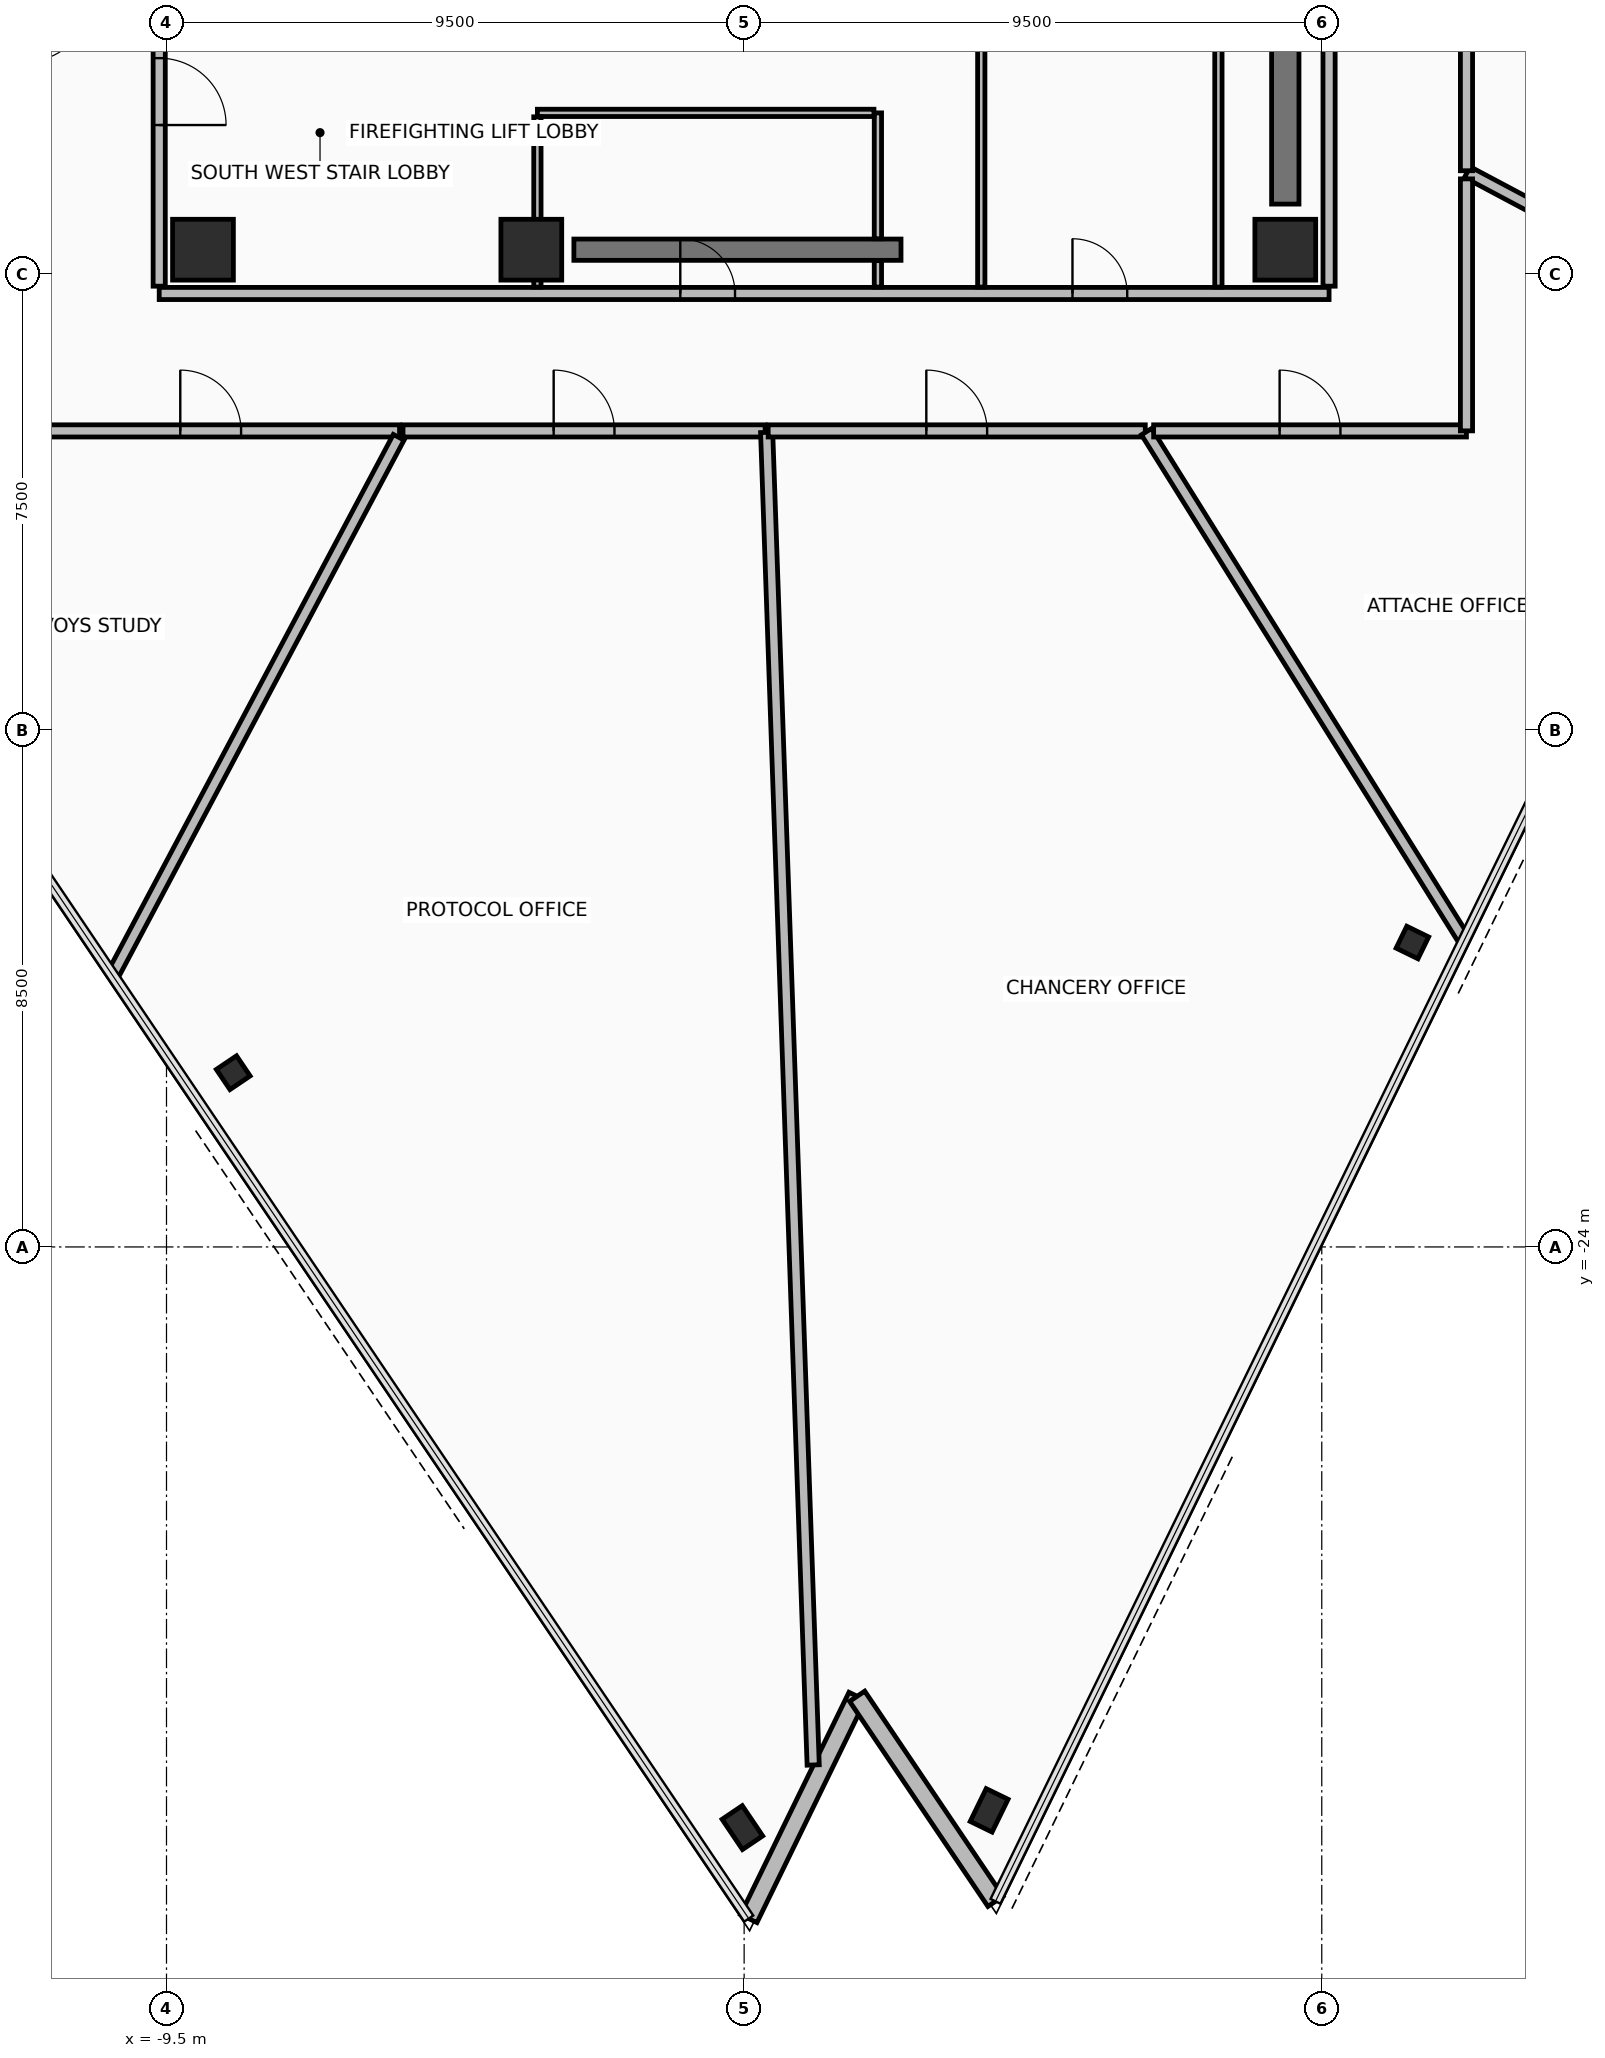
"""IFC4 building model, lengths in metres.
Left out: names, types, materials, properties, quantities, classifications, styles, units other than length and angle.
Written with IfcOpenShell. Run it as: python <this file> out.ifc"""

import sys

from ifc_helpers import new_model, si_unit, direction, frame, frame_2d, origin, origin_2d, place, context, subcontext, project, spatial, rectangle, hollow_rectangle, extrude, element, fill, save


model = new_model("IFC4")
c1 = context("Model", 3, precision=1e-05, world=origin(), true_north=direction((0.0, 1.0)))
c2 = subcontext(c1, "Body", "Model", "MODEL_VIEW")
j1 = project(units=[si_unit("LENGTHUNIT", "METRE"), si_unit("PLANEANGLEUNIT", "RADIAN")], contexts=[c1])
p1 = place(None, origin())
s1 = spatial("IfcSite", under=j1, at=p1, CompositionType="ELEMENT")
p2 = place(p1, origin())
s2 = spatial("IfcBuilding", under=s1, at=p2, CompositionType="ELEMENT")
p3 = place(p2, frame((0.0, 0.0, 275.0)))
s3 = spatial("IfcBuildingStorey", under=s2, at=p3, CompositionType="ELEMENT", Elevation=275.0)
for number, where, z_axis, x_axis in (
    (1, (-8.9, -7.6, 0.0), (0.0, 0.0, 1.0), (1.0, 0.0, 0.0)),
    (2, (-3.5, -7.6, 0.0), (0.0, 0.0, 1.0), (1.0, 0.0, 0.0)),
    (3, (8.9, -7.6, 0.0), (0.0, 0.0, 1.0), (1.0, 0.0, 0.0)),
):
    element("IfcColumn", number, at=place(p3, frame(where, z_axis=z_axis, x_axis=x_axis)), inside=s3, PredefinedType="COLUMN", context=c2, shape_type="SweptSolid", body=[
        extrude(rectangle(XDim=1.0, YDim=1.0, at=origin_2d()), origin(), (0.0, 0.0, 1.0), 4.75),
    ])
p4 = place(p3, frame((-8.402, -21.135, 0.0), z_axis=(0.0, 0.0, 1.0), x_axis=(-0.559192903471, 0.829037572555, 0.0)))
e4 = element("IfcColumn", 4, at=p4, inside=s3, PredefinedType="COLUMN", context=c2, shape_type="SweptSolid", body=[
    extrude(hollow_rectangle(XDim=0.4, YDim=0.4, WallThickness=0.025, at=origin_2d()), origin(), (0.0, 0.0, 1.0), 4.75),
])
for number, where, z_axis, x_axis in (
    (5, (-0.029, -33.549, 0.0), (0.0, 0.0, 1.0), (-0.559, 0.829, 0.0)),
    (6, (4.029, -33.265, 0.0), (0.0, 0.0, 1.0), (0.438, 0.899, 0.0)),
):
    element("IfcColumn", number, at=place(p3, frame(where, z_axis=z_axis, x_axis=x_axis)), inside=s3, PredefinedType="COLUMN", context=c2, shape_type="SweptSolid", body=[
        extrude(hollow_rectangle(XDim=0.4, YDim=0.6, WallThickness=0.03, at=origin_2d()), origin(), (0.0, 0.0, 1.0), 4.75),
    ])
p5 = place(p3, frame((10.99, -18.994, 0.0), z_axis=(0.0, 0.0, 1.0), x_axis=(0.43837271548, 0.898793281196, 0.0)))
e7 = element("IfcColumn", 7, at=p5, inside=s3, PredefinedType="COLUMN", context=c2, shape_type="SweptSolid", body=[
    extrude(hollow_rectangle(XDim=0.4, YDim=0.4, WallThickness=0.025, at=origin_2d()), origin(), (0.0, 0.0, 1.0), 4.75),
])
p6 = place(p3, frame((0.076, -35.045, 0.0), z_axis=(0.0, 0.0, 1.0), x_axis=(0.438357414153, 0.898800744024, 0.0)))
e8 = element("IfcWall", 8, at=p6, inside=s3, PredefinedType="STANDARD", context=c2, shape_type="SweptSolid", body=[
    extrude(rectangle(XDim=4.068, YDim=0.3, at=frame_2d((2.034, 0.0))), origin(), (0.0, 0.0, 1.0), 2.255),
])
p7 = place(p3, frame((1.859, -31.389, 0.0), z_axis=(0.0, 0.0, 1.0), x_axis=(0.559206900681, -0.829028131145, 0.0)))
e9 = element("IfcWall", 9, at=p7, inside=s3, PredefinedType="STANDARD", context=c2, shape_type="SweptSolid", body=[
    extrude(rectangle(XDim=4.068, YDim=0.3, at=frame_2d((2.034, 0.0))), origin(), (0.0, 0.0, 1.0), 2.255),
])
p8 = place(p3, frame((-2.8, -7.6, 0.0), z_axis=(0.0, 0.0, 1.0), x_axis=(1.0, 0.0, 0.0)))
e10 = element("IfcWall", 10, at=p8, inside=s3, PredefinedType="SHEAR", context=c2, shape_type="SweptSolid", body=[
    extrude(rectangle(XDim=5.38, YDim=0.35, at=frame_2d((2.69, 0.0))), origin(), (0.0, 0.0, 1.0), 4.56),
])
p9 = place(p3, frame((8.9, -6.85, 0.0), z_axis=(0.0, 0.0, 1.0), x_axis=(0.0, 1.0, 0.0)))
e11 = element("IfcWall", 11, at=p9, inside=s3, PredefinedType="SHEAR", context=c2, shape_type="SweptSolid", body=[
    extrude(rectangle(XDim=10.7, YDim=0.45, at=frame_2d((5.35, 0.0))), origin(), (0.0, 0.0, 1.0), 4.56),
])
p10 = place(p3, frame((-9.62, -8.32, 0.0), z_axis=(0.0, 0.0, 1.0), x_axis=(1.0, 0.0, 0.0)))
e12 = element("IfcWall", 12, at=p10, inside=s3, PredefinedType="PARTITIONING", context=c2, shape_type="SweptSolid", body=[
    extrude(rectangle(XDim=19.24, YDim=0.2, at=frame_2d((9.62, 0.0))), origin(), (0.0, 0.0, 1.0), 2.355),
])
p11 = place(p10, frame((8.57, 0.0, 0.0)))
e13 = element("IfcOpeningElement", 13, at=p11, cuts=e12, PredefinedType="OPENING", context=c2, shape_type="SweptSolid", body=[
    extrude(rectangle(XDim=0.9, YDim=2.1, at=frame_2d((0.45, 1.05))), frame((0.0, 0.11, 0.0), z_axis=(0.0, -1.0, 0.0), x_axis=(1.0, 0.0, 0.0)), (0.0, 0.0, 1.0), 0.22),
])
p12 = place(p10, frame((15.02, 0.0, 0.0)))
e14 = element("IfcOpeningElement", 14, at=p12, cuts=e12, PredefinedType="OPENING", context=c2, shape_type="SweptSolid", body=[
    extrude(rectangle(XDim=0.9, YDim=2.1, at=frame_2d((0.45, 1.05))), frame((0.0, 0.11, 0.0), z_axis=(0.0, -1.0, 0.0), x_axis=(1.0, 0.0, 0.0)), (0.0, 0.0, 1.0), 0.22),
])
p13 = place(p3, frame((-9.62, 8.2, 0.0), z_axis=(0.0, 0.0, 1.0), x_axis=(0.0, -1.0, 0.0)))
e15 = element("IfcWall", 15, at=p13, inside=s3, PredefinedType="PARTITIONING", context=c2, shape_type="SweptSolid", body=[
    extrude(rectangle(XDim=16.4, YDim=0.2, at=frame_2d((8.2, 0.0))), origin(), (0.0, 0.0, 1.0), 2.355),
])
p14 = place(p13, frame((12.65, 0.0, 0.0)))
e16 = element("IfcOpeningElement", 16, at=p14, cuts=e15, PredefinedType="OPENING", context=c2, shape_type="SweptSolid", body=[
    extrude(rectangle(XDim=1.1, YDim=2.15, at=frame_2d((0.55, 1.075))), frame((0.0, 0.11, 0.0), z_axis=(0.0, -1.0, 0.0), x_axis=(1.0, 0.0, 0.0)), (0.0, 0.0, 1.0), 0.22),
])
p15 = place(p3, frame((9.62, -8.2, 0.0), z_axis=(0.0, 0.0, 1.0), x_axis=(0.0, 1.0, 0.0)))
e17 = element("IfcWall", 17, at=p15, inside=s3, PredefinedType="PARTITIONING", context=c2, shape_type="SweptSolid", body=[
    extrude(rectangle(XDim=16.4, YDim=0.2, at=frame_2d((8.2, 0.0))), origin(), (0.0, 0.0, 1.0), 2.355),
])
p16 = place(p15, frame((12.65, 0.0, 0.0)))
e18 = element("IfcOpeningElement", 18, at=p16, cuts=e17, PredefinedType="OPENING", context=c2, shape_type="SweptSolid", body=[
    extrude(rectangle(XDim=1.1, YDim=2.15, at=frame_2d((0.55, 1.075))), frame((0.0, 0.11, 0.0), z_axis=(0.0, -1.0, 0.0), x_axis=(1.0, 0.0, 0.0)), (0.0, 0.0, 1.0), 0.22),
])
p17 = place(p3, frame((2.2, -8.215, 0.0), z_axis=(0.0, 0.0, 1.0), x_axis=(0.0, 1.0, 0.0)))
e19 = element("IfcWall", 19, at=p17, inside=s3, PredefinedType="PARTITIONING", context=c2, shape_type="SweptSolid", body=[
    extrude(rectangle(XDim=0.435, YDim=0.12, at=frame_2d((0.218, 0.0))), origin(), (0.0, 0.0, 1.0), 3.855),
])
p18 = place(p3, frame((2.2, -7.42, 0.0), z_axis=(0.0, 0.0, 1.0), x_axis=(0.0, 1.0, 0.0)))
e20 = element("IfcWall", 20, at=p18, inside=s3, PredefinedType="PARTITIONING", context=c2, shape_type="SweptSolid", body=[
    extrude(rectangle(XDim=2.07, YDim=0.12, at=frame_2d((1.035, 0.0))), origin(), (0.0, 0.0, 1.0), 3.855),
])
p19 = place(p3, frame((2.135, -5.35, 0.0), z_axis=(0.0, 0.0, 1.0), x_axis=(-1.0, 0.0, 0.0)))
e21 = element("IfcWall", 21, at=p19, inside=s3, PredefinedType="PARTITIONING", context=c2, shape_type="SweptSolid", body=[
    extrude(rectangle(XDim=5.535, YDim=0.12, at=frame_2d((2.768, 0.0))), origin(), (0.0, 0.0, 1.0), 3.855),
])
p20 = place(p3, frame((-3.4, -5.415, 0.0), z_axis=(0.0, 0.0, 1.0), x_axis=(0.0, -1.0, 0.0)))
e22 = element("IfcWall", 22, at=p20, inside=s3, PredefinedType="PARTITIONING", context=c2, shape_type="SweptSolid", body=[
    extrude(rectangle(XDim=2.8, YDim=0.12, at=frame_2d((1.4, 0.0))), origin(), (0.0, 0.0, 1.0), 2.355),
])
p21 = place(p3, frame((7.8, -8.215, 0.0), z_axis=(0.0, 0.0, 1.0), x_axis=(0.0, 1.0, 0.0)))
e23 = element("IfcWall", 23, at=p21, inside=s3, PredefinedType="PARTITIONING", context=c2, shape_type="SweptSolid", body=[
    extrude(rectangle(XDim=4.015, YDim=0.12, at=frame_2d((2.008, 0.0))), origin(), (0.0, 0.0, 1.0), 3.855),
])
p22 = place(p3, frame((3.9, -4.265, 0.0), z_axis=(0.0, 0.0, 1.0), x_axis=(0.0, -1.0, 0.0)))
e24 = element("IfcWall", 24, at=p22, inside=s3, PredefinedType="PARTITIONING", context=c2, shape_type="SweptSolid", body=[
    extrude(rectangle(XDim=3.95, YDim=0.12, at=frame_2d((1.975, 0.0))), origin(), (0.0, 0.0, 1.0), 3.855),
])
p23 = place(p3, frame((16.723, -8.892, 0.0), z_axis=(0.0, 0.0, 1.0), x_axis=(-0.882952698851, 0.469461959686, 0.0)))
e25 = element("IfcWall", 25, at=p23, inside=s3, PredefinedType="PARTITIONING", context=c2, shape_type="SweptSolid", body=[
    extrude(rectangle(XDim=5.47, YDim=0.2, at=frame_2d((2.735, 0.0))), origin(), (0.0, 0.0, 1.0), 2.255),
])
p24 = place(p3, frame((11.88, -6.302, 0.0), z_axis=(0.0, 0.0, 1.0), x_axis=(0.0, 1.0, 0.0)))
e26 = element("IfcWall", 26, at=p24, inside=s3, PredefinedType="PARTITIONING", context=c2, shape_type="SweptSolid", body=[
    extrude(rectangle(XDim=4.177, YDim=0.2, at=frame_2d((2.088, 0.0))), origin(), (0.0, 0.0, 1.0), 2.355),
])
p25 = place(p3, frame((-11.879, -10.58, 0.0), z_axis=(0.0, 0.0, 1.0), x_axis=(1.0, 0.0, 0.0)))
e27 = element("IfcWall", 27, at=p25, inside=s3, PredefinedType="PARTITIONING", context=c2, shape_type="SweptSolid", body=[
    extrude(rectangle(XDim=6.212, YDim=0.2, at=frame_2d((3.106, 0.0))), origin(), (0.0, 0.0, 1.0), 4.315),
])
p26 = place(p25, frame((2.606, 0.0, 0.0)))
e28 = element("IfcOpeningElement", 28, at=p26, cuts=e27, PredefinedType="OPENING", context=c2, shape_type="SweptSolid", body=[
    extrude(rectangle(XDim=1.0, YDim=2.15, at=frame_2d((0.5, 1.075))), frame((0.0, 0.11, 0.0), z_axis=(0.0, -1.0, 0.0), x_axis=(1.0, 0.0, 0.0)), (0.0, 0.0, 1.0), 0.22),
])
p27 = place(p3, frame((-5.681, -10.685, 0.0), z_axis=(0.0, 0.0, 1.0), x_axis=(-0.469465104715, -0.882951026646, 0.0)))
e29 = element("IfcWall", 29, at=p27, inside=s3, PredefinedType="PARTITIONING", context=c2, shape_type="SweptSolid", body=[
    extrude(rectangle(XDim=10.022, YDim=0.2, at=frame_2d((5.011, 0.0))), origin(), (0.0, 0.0, 1.0), 2.255),
])
p28 = place(p3, frame((-5.611, -10.58, 0.0), z_axis=(0.0, 0.0, 1.0), x_axis=(1.0, 0.0, 0.0)))
e30 = element("IfcWall", 30, at=p28, inside=s3, PredefinedType="PARTITIONING", context=c2, shape_type="SweptSolid", body=[
    extrude(rectangle(XDim=5.956, YDim=0.2, at=frame_2d((2.978, 0.0))), origin(), (0.0, 0.0, 1.0), 2.355),
])
p29 = place(p28, frame((2.478, 0.0, 0.0)))
e31 = element("IfcOpeningElement", 31, at=p29, cuts=e30, PredefinedType="OPENING", context=c2, shape_type="SweptSolid", body=[
    extrude(rectangle(XDim=1.0, YDim=2.15, at=frame_2d((0.5, 1.075))), frame((0.0, 0.11, 0.0), z_axis=(0.0, -1.0, 0.0), x_axis=(1.0, 0.0, 0.0)), (0.0, 0.0, 1.0), 0.22),
])
p30 = place(p3, frame((0.37, -10.604, 0.0), z_axis=(0.0, 0.0, 1.0), x_axis=(0.034892513881, -0.99939107084, 0.0)))
e32 = element("IfcWall", 32, at=p30, inside=s3, PredefinedType="PARTITIONING", context=c2, shape_type="SweptSolid", body=[
    extrude(rectangle(XDim=21.928, YDim=0.2, at=frame_2d((10.964, 0.0))), origin(), (0.0, 0.0, 1.0), 2.355),
])
p31 = place(p3, frame((0.395, -10.58, 0.0), z_axis=(0.0, 0.0, 1.0), x_axis=(1.0, 0.0, 0.0)))
e33 = element("IfcWall", 33, at=p31, inside=s3, PredefinedType="PARTITIONING", context=c2, shape_type="SweptSolid", body=[
    extrude(rectangle(XDim=6.202, YDim=0.2, at=frame_2d((3.101, 0.0))), origin(), (0.0, 0.0, 1.0), 4.56),
])
p32 = place(p31, frame((2.601, 0.0, 0.0)))
e34 = element("IfcOpeningElement", 34, at=p32, cuts=e33, PredefinedType="OPENING", context=c2, shape_type="SweptSolid", body=[
    extrude(rectangle(XDim=1.0, YDim=2.15, at=frame_2d((0.5, 1.075))), frame((0.0, 0.11, 0.0), z_axis=(0.0, -1.0, 0.0), x_axis=(1.0, 0.0, 0.0)), (0.0, 0.0, 1.0), 0.22),
])
p33 = place(p3, frame((6.618, -10.592, 0.0), z_axis=(0.0, 0.0, 1.0), x_axis=(0.529918705885, -0.848048445051, 0.0)))
e35 = element("IfcWall", 35, at=p33, inside=s3, PredefinedType="PARTITIONING", context=c2, shape_type="SweptSolid", body=[
    extrude(rectangle(XDim=9.847, YDim=0.2, at=frame_2d((4.923, 0.0))), origin(), (0.0, 0.0, 1.0), 2.255),
])
p34 = place(p3, frame((6.735, -10.58, 0.0), z_axis=(0.0, 0.0, 1.0), x_axis=(1.0, 0.0, 0.0)))
e36 = element("IfcWall", 36, at=p34, inside=s3, PredefinedType="PARTITIONING", context=c2, shape_type="SweptSolid", body=[
    extrude(rectangle(XDim=5.145, YDim=0.2, at=frame_2d((2.572, 0.0))), origin(), (0.0, 0.0, 1.0), 2.355),
])
p35 = place(p34, frame((2.072, 0.0, 0.0)))
e37 = element("IfcOpeningElement", 37, at=p35, cuts=e36, PredefinedType="OPENING", context=c2, shape_type="SweptSolid", body=[
    extrude(rectangle(XDim=1.0, YDim=2.15, at=frame_2d((0.5, 1.075))), frame((0.0, 0.11, 0.0), z_axis=(0.0, -1.0, 0.0), x_axis=(1.0, 0.0, 0.0)), (0.0, 0.0, 1.0), 0.22),
])
p36 = place(p3, frame((11.88, -10.579, 0.0), z_axis=(0.0, 0.0, 1.0), x_axis=(0.0, 1.0, 0.0)))
e38 = element("IfcWall", 38, at=p36, inside=s3, PredefinedType="PARTITIONING", context=c2, shape_type="SweptSolid", body=[
    extrude(rectangle(XDim=4.144, YDim=0.2, at=frame_2d((2.072, 0.0))), origin(), (0.0, 0.0, 1.0), 4.315),
])
p37 = place(p14, frame((1.1, 0.0, 0.0), z_axis=(0.0, 0.0, 1.0), x_axis=(-1.0, 0.0, 0.0)))
e39 = element("IfcDoor", 39, at=p37, inside=s3, OperationType="SINGLE_SWING_LEFT", PredefinedType="DOOR", context=c2, shape_type="SweptSolid", body=[
    extrude(rectangle(XDim=1.1, YDim=2.15, at=frame_2d((0.55, 1.075))), frame((0.0, 0.025, 0.0), z_axis=(0.0, -1.0, 0.0), x_axis=(1.0, 0.0, 0.0)), (0.0, 0.0, 1.0), 0.05),
])
fill(e16, e39)
p38 = place(p11, origin())
e40 = element("IfcDoor", 40, at=p38, inside=s3, OperationType="SINGLE_SWING_LEFT", PredefinedType="DOOR", context=c2, shape_type="SweptSolid", body=[
    extrude(rectangle(XDim=0.9, YDim=2.1, at=frame_2d((0.45, 1.05))), frame((0.0, 0.025, 0.0), z_axis=(0.0, -1.0, 0.0), x_axis=(1.0, 0.0, 0.0)), (0.0, 0.0, 1.0), 0.05),
])
fill(e13, e40)
p39 = place(p12, origin())
e41 = element("IfcDoor", 41, at=p39, inside=s3, OperationType="SINGLE_SWING_LEFT", PredefinedType="DOOR", context=c2, shape_type="SweptSolid", body=[
    extrude(rectangle(XDim=0.9, YDim=2.1, at=frame_2d((0.45, 1.05))), frame((0.0, 0.025, 0.0), z_axis=(0.0, -1.0, 0.0), x_axis=(1.0, 0.0, 0.0)), (0.0, 0.0, 1.0), 0.05),
])
fill(e14, e41)
p40 = place(p26, origin())
e42 = element("IfcDoor", 42, at=p40, inside=s3, OperationType="SINGLE_SWING_RIGHT", PredefinedType="DOOR", context=c2, shape_type="SweptSolid", body=[
    extrude(rectangle(XDim=1.0, YDim=2.15, at=frame_2d((0.5, 1.075))), frame((0.0, 0.025, 0.0), z_axis=(0.0, -1.0, 0.0), x_axis=(1.0, 0.0, 0.0)), (0.0, 0.0, 1.0), 0.05),
])
fill(e28, e42)
p41 = place(p29, origin())
e43 = element("IfcDoor", 43, at=p41, inside=s3, OperationType="SINGLE_SWING_RIGHT", PredefinedType="DOOR", context=c2, shape_type="SweptSolid", body=[
    extrude(rectangle(XDim=1.0, YDim=2.15, at=frame_2d((0.5, 1.075))), frame((0.0, 0.025, 0.0), z_axis=(0.0, -1.0, 0.0), x_axis=(1.0, 0.0, 0.0)), (0.0, 0.0, 1.0), 0.05),
])
fill(e31, e43)
p42 = place(p32, origin())
e44 = element("IfcDoor", 44, at=p42, inside=s3, OperationType="SINGLE_SWING_RIGHT", PredefinedType="DOOR", context=c2, shape_type="SweptSolid", body=[
    extrude(rectangle(XDim=1.0, YDim=2.15, at=frame_2d((0.5, 1.075))), frame((0.0, 0.025, 0.0), z_axis=(0.0, -1.0, 0.0), x_axis=(1.0, 0.0, 0.0)), (0.0, 0.0, 1.0), 0.05),
])
fill(e34, e44)
p43 = place(p35, origin())
e45 = element("IfcDoor", 45, at=p43, inside=s3, OperationType="SINGLE_SWING_RIGHT", PredefinedType="DOOR", context=c2, shape_type="SweptSolid", body=[
    extrude(rectangle(XDim=1.0, YDim=2.15, at=frame_2d((0.5, 1.075))), frame((0.0, 0.025, 0.0), z_axis=(0.0, -1.0, 0.0), x_axis=(1.0, 0.0, 0.0)), (0.0, 0.0, 1.0), 0.05),
])
fill(e37, e45)
save(model, sys.argv[1])
